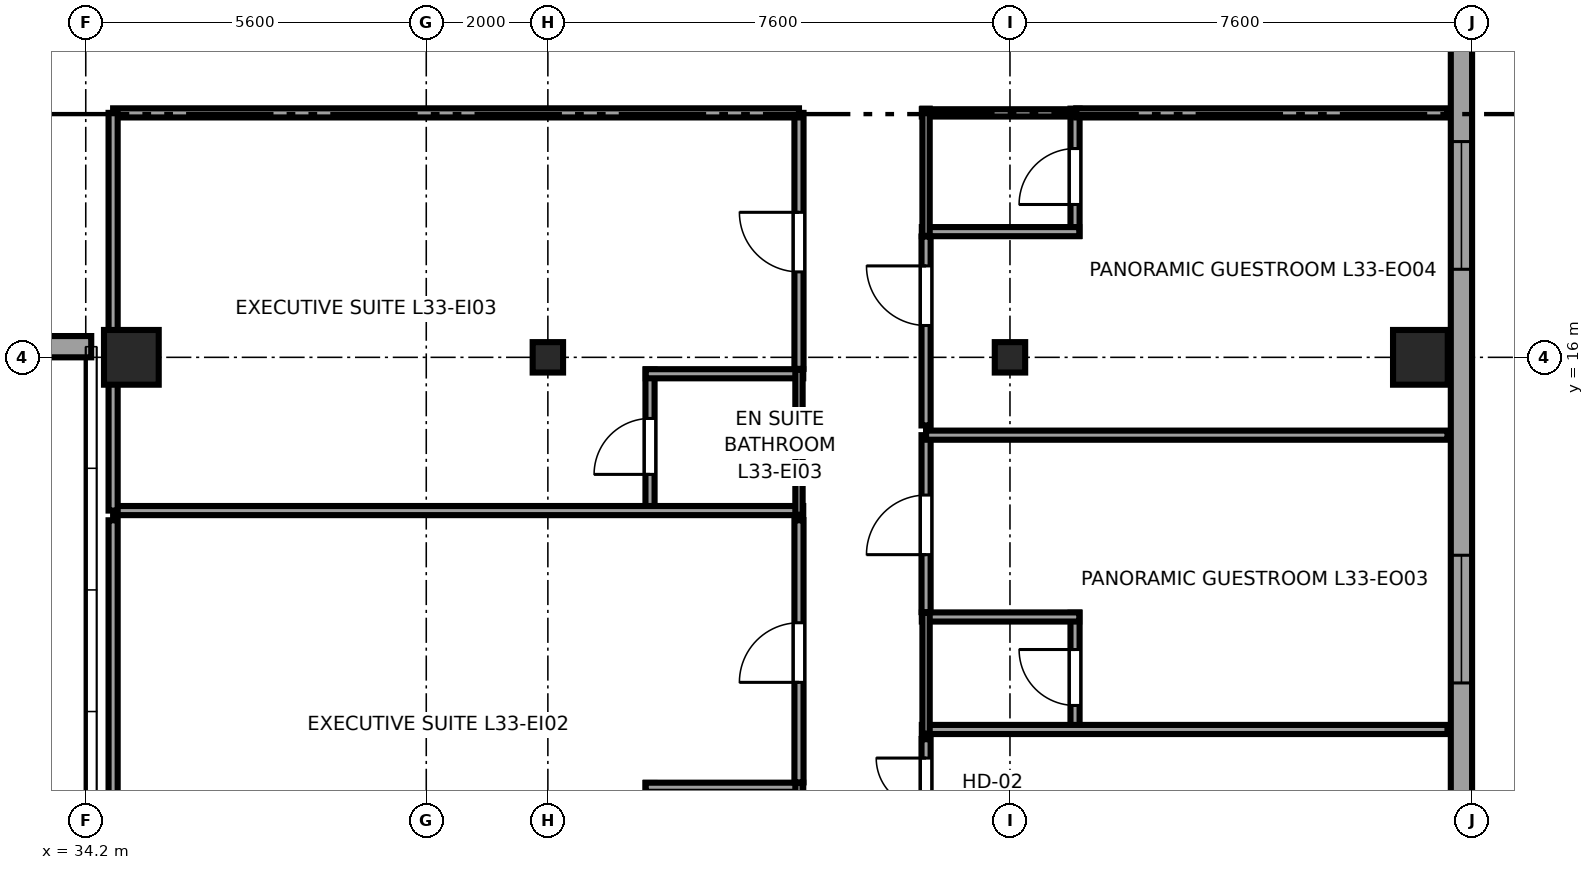
"""IFC4 building model, lengths in metres.
Left out: names, types, materials, properties, quantities, classifications, styles, units other than length and angle.
Written with IfcOpenShell. Run it as: python <this file> out.ifc"""

import sys

from ifc_helpers import new_model, si_unit, direction, frame, frame_2d, origin, origin_2d, place, context, subcontext, project, spatial, rectangle, i_section, extrude, source, transform, mapped, element, fill, save


model = new_model("IFC4")
c1 = context("Model", 3, precision=1e-05, world=origin(), true_north=direction((0.0, 1.0)))
c2 = subcontext(c1, "Body", "Model", "MODEL_VIEW")
j1 = project(units=[si_unit("LENGTHUNIT", "METRE"), si_unit("PLANEANGLEUNIT", "RADIAN")], contexts=[c1])
p1 = place(None, origin())
s1 = spatial("IfcSite", under=j1, at=p1, CompositionType="ELEMENT")
p2 = place(p1, origin())
s2 = spatial("IfcBuilding", under=s1, at=p2, CompositionType="ELEMENT")
p3 = place(p2, frame((0.0, 0.0, 129.3)))
s3 = spatial("IfcBuildingStorey", under=s2, at=p3, CompositionType="ELEMENT", Elevation=129.3)
m1 = source(origin(), c2, "Body", "SweptSolid", [
    extrude(rectangle(XDim=0.9, YDim=0.9, at=origin_2d()), origin(), (0.0, 0.0, 1.0), 3.55),
])
p4 = place(p3, frame((34.95, 16.0, 0.0), z_axis=(0.0, 0.0, 1.0), x_axis=(1.0, 0.0, 0.0)))
e1 = element("IfcColumn", 1, at=p4, inside=s3, PredefinedType="COLUMN", context=c2, shape_type="MappedRepresentation", body=[
    mapped(m1, transform((0.0, 0.0, 0.0), x_axis=(1.0, 0.0, 0.0), y_axis=(0.0, 1.0, 0.0), z_axis=(0.0, 0.0, 1.0), scale=1.0)),
])
m2 = source(origin(), c2, "Body", "SweptSolid", [
    extrude(i_section(OverallWidth=0.5, OverallDepth=0.5, WebThickness=0.022, FlangeThickness=0.034, at=origin_2d()), origin(), (0.0, 0.0, 1.0), 3.55),
])
for number, where, z_axis, x_axis in (
    (2, (41.8, 16.0, 0.0), (0.0, 0.0, 1.0), (1.0, 0.0, 0.0)),
    (3, (49.4, 16.0, 0.0), (0.0, 0.0, 1.0), (1.0, 0.0, 0.0)),
):
    element("IfcColumn", number, at=place(p3, frame(where, z_axis=z_axis, x_axis=x_axis)), inside=s3, PredefinedType="COLUMN", context=c2, shape_type="MappedRepresentation", body=[
        mapped(m2, transform((0.0, 0.0, 0.0), x_axis=(1.0, 0.0, 0.0), y_axis=(0.0, 1.0, 0.0), z_axis=(0.0, 0.0, 1.0), scale=1.0)),
    ])
p5 = place(p3, frame((56.15, 16.0, 0.0), z_axis=(0.0, 0.0, 1.0), x_axis=(1.0, 0.0, 0.0)))
e4 = element("IfcColumn", 4, at=p5, inside=s3, PredefinedType="COLUMN", context=c2, shape_type="MappedRepresentation", body=[
    mapped(m1, transform((0.0, 0.0, 0.0), x_axis=(1.0, 0.0, 0.0), y_axis=(0.0, 1.0, 0.0), z_axis=(0.0, 0.0, 1.0), scale=1.0)),
])
p6 = place(p3, frame((22.71, 16.175, 0.0), z_axis=(0.0, 0.0, 1.0), x_axis=(1.0, 0.0, 0.0)))
e5 = element("IfcWall", 5, at=p6, inside=s3, PredefinedType="SOLIDWALL", context=c2, shape_type="SweptSolid", body=[
    extrude(rectangle(XDim=11.58, YDim=0.35, at=frame_2d((5.79, 0.0))), origin(), (0.0, 0.0, 1.0), 2.748),
])
p7 = place(p6, frame((2.145, 0.0, 0.68)))
e6 = element("IfcOpeningElement", 6, at=p7, cuts=e5, PredefinedType="OPENING", context=c2, shape_type="SweptSolid", body=[
    extrude(rectangle(XDim=2.1, YDim=1.9, at=frame_2d((1.05, 0.95))), frame((0.0, 0.185, 0.0), z_axis=(0.0, -1.0, 0.0), x_axis=(1.0, 0.0, 0.0)), (0.0, 0.0, 1.0), 0.37),
])
p8 = place(p6, frame((7.335, 0.0, 0.68)))
e7 = element("IfcOpeningElement", 7, at=p8, cuts=e5, PredefinedType="OPENING", context=c2, shape_type="SweptSolid", body=[
    extrude(rectangle(XDim=2.1, YDim=1.9, at=frame_2d((1.05, 0.95))), frame((0.0, 0.185, 0.0), z_axis=(0.0, -1.0, 0.0), x_axis=(1.0, 0.0, 0.0)), (0.0, 0.0, 1.0), 0.37),
])
p9 = place(p3, frame((56.825, 4.617, 0.0), z_axis=(0.0, 0.0, 1.0), x_axis=(0.0, 1.0, 0.0)))
e8 = element("IfcWall", 8, at=p9, inside=s3, PredefinedType="SOLIDWALL", context=c2, shape_type="SweptSolid", body=[
    extrude(rectangle(XDim=36.766, YDim=0.35, at=frame_2d((18.383, 0.0))), origin(), (0.0, 0.0, 1.0), 3.37),
])
p10 = place(p9, frame((6.028, 0.0, 0.68)))
e9 = element("IfcOpeningElement", 9, at=p10, cuts=e8, PredefinedType="OPENING", context=c2, shape_type="SweptSolid", body=[
    extrude(rectangle(XDim=2.1, YDim=1.9, at=frame_2d((1.05, 0.95))), frame((0.0, 0.185, 0.0), z_axis=(0.0, -1.0, 0.0), x_axis=(1.0, 0.0, 0.0)), (0.0, 0.0, 1.0), 0.37),
])
p11 = place(p9, frame((12.831, 0.0, 0.68)))
e10 = element("IfcOpeningElement", 10, at=p11, cuts=e8, PredefinedType="OPENING", context=c2, shape_type="SweptSolid", body=[
    extrude(rectangle(XDim=2.1, YDim=1.9, at=frame_2d((1.05, 0.95))), frame((0.0, 0.185, 0.0), z_axis=(0.0, -1.0, 0.0), x_axis=(1.0, 0.0, 0.0)), (0.0, 0.0, 1.0), 0.37),
])
p12 = place(p9, frame((21.285, 0.0, 0.68)))
e11 = element("IfcOpeningElement", 11, at=p12, cuts=e8, PredefinedType="OPENING", context=c2, shape_type="SweptSolid", body=[
    extrude(rectangle(XDim=2.1, YDim=1.9, at=frame_2d((1.05, 0.95))), frame((0.0, 0.185, 0.0), z_axis=(0.0, -1.0, 0.0), x_axis=(1.0, 0.0, 0.0)), (0.0, 0.0, 1.0), 0.37),
])
p13 = place(p9, frame((30.238, 0.0, 0.68)))
e12 = element("IfcOpeningElement", 12, at=p13, cuts=e8, PredefinedType="OPENING", context=c2, shape_type="SweptSolid", body=[
    extrude(rectangle(XDim=2.1, YDim=1.9, at=frame_2d((1.05, 0.95))), frame((0.0, 0.185, 0.0), z_axis=(0.0, -1.0, 0.0), x_axis=(1.0, 0.0, 0.0)), (0.0, 0.0, 1.0), 0.37),
])
p14 = place(p9, frame((1.933, 0.0, 0.62)))
e13 = element("IfcOpeningElement", 13, at=p14, cuts=e8, PredefinedType="OPENING", context=c2, shape_type="SweptSolid", body=[
    extrude(rectangle(XDim=1.5, YDim=1.55, at=frame_2d((0.75, 0.775))), frame((0.0, 0.185, 0.0), z_axis=(0.0, -1.0, 0.0), x_axis=(1.0, 0.0, 0.0)), (0.0, 0.0, 1.0), 0.37),
])
p15 = place(p3, frame((43.48, 6.61, 0.0), z_axis=(0.0, 0.0, 1.0), x_axis=(0.0, 1.0, 0.0)))
e14 = element("IfcWall", 14, at=p15, inside=s3, PredefinedType="PARTITIONING", context=c2, shape_type="SweptSolid", body=[
    extrude(rectangle(XDim=2.39, YDim=0.15, at=frame_2d((1.195, 0.0))), origin(), (0.0, 0.0, 1.0), 3.37),
])
p16 = place(p15, frame((0.665, 0.0, 0.0)))
e15 = element("IfcOpeningElement", 15, at=p16, cuts=e14, PredefinedType="OPENING", context=c2, shape_type="SweptSolid", body=[
    extrude(rectangle(XDim=0.92, YDim=2.01, at=frame_2d((0.46, 1.005))), frame((0.0, 0.085, 0.0), z_axis=(0.0, -1.0, 0.0), x_axis=(1.0, 0.0, 0.0)), (0.0, 0.0, 1.0), 0.17),
])
p17 = place(p3, frame((43.41, 8.93, 0.0), z_axis=(0.0, 0.0, 1.0), x_axis=(1.0, 0.0, 0.0)))
e16 = element("IfcWall", 16, at=p17, inside=s3, PredefinedType="PARTITIONING", context=c2, shape_type="SweptSolid", body=[
    extrude(rectangle(XDim=2.59, YDim=0.15, at=frame_2d((1.295, 0.0))), origin(), (0.0, 0.0, 1.0), 3.37),
])
p18 = place(p3, frame((45.93, 6.61, 0.0), z_axis=(0.0, 0.0, 1.0), x_axis=(0.0, 1.0, 0.0)))
e17 = element("IfcWall", 17, at=p18, inside=s3, PredefinedType="PLUMBINGWALL", context=c2, shape_type="SweptSolid", body=[
    extrude(rectangle(XDim=2.39, YDim=0.12, at=frame_2d((1.195, 0.0))), origin(), (0.0, 0.0, 1.0), 3.37),
])
p19 = place(p3, frame((43.48, 13.41, 0.0), z_axis=(0.0, 0.0, 1.0), x_axis=(0.0, 1.0, 0.0)))
e18 = element("IfcWall", 18, at=p19, inside=s3, PredefinedType="PARTITIONING", context=c2, shape_type="SweptSolid", body=[
    extrude(rectangle(XDim=2.39, YDim=0.15, at=frame_2d((1.195, 0.0))), origin(), (0.0, 0.0, 1.0), 3.37),
])
p20 = place(p19, frame((0.665, 0.0, 0.0)))
e19 = element("IfcOpeningElement", 19, at=p20, cuts=e18, PredefinedType="OPENING", context=c2, shape_type="SweptSolid", body=[
    extrude(rectangle(XDim=0.92, YDim=2.01, at=frame_2d((0.46, 1.005))), frame((0.0, 0.085, 0.0), z_axis=(0.0, -1.0, 0.0), x_axis=(1.0, 0.0, 0.0)), (0.0, 0.0, 1.0), 0.17),
])
p21 = place(p3, frame((34.65, 13.48, 0.0), z_axis=(0.0, 0.0, 1.0), x_axis=(1.0, 0.0, 0.0)))
e20 = element("IfcWall", 20, at=p21, inside=s3, PredefinedType="PARTITIONING", context=c2, shape_type="SweptSolid", body=[
    extrude(rectangle(XDim=11.35, YDim=0.15, at=frame_2d((5.675, 0.0))), origin(), (0.0, 0.0, 1.0), 3.37),
])
p22 = place(p3, frame((43.41, 15.73, 0.0), z_axis=(0.0, 0.0, 1.0), x_axis=(1.0, 0.0, 0.0)))
e21 = element("IfcWall", 21, at=p22, inside=s3, PredefinedType="PARTITIONING", context=c2, shape_type="SweptSolid", body=[
    extrude(rectangle(XDim=2.59, YDim=0.15, at=frame_2d((1.295, 0.0))), origin(), (0.0, 0.0, 1.0), 3.37),
])
p23 = place(p3, frame((45.93, 13.41, 0.0), z_axis=(0.0, 0.0, 1.0), x_axis=(0.0, 1.0, 0.0)))
e22 = element("IfcWall", 22, at=p23, inside=s3, PredefinedType="PLUMBINGWALL", context=c2, shape_type="SweptSolid", body=[
    extrude(rectangle(XDim=2.39, YDim=0.12, at=frame_2d((1.195, 0.0))), origin(), (0.0, 0.0, 1.0), 3.37),
])
p24 = place(p3, frame((50.47, 9.81, 0.0), z_axis=(0.0, 0.0, 1.0), x_axis=(0.0, 1.0, 0.0)))
e23 = element("IfcWall", 23, at=p24, inside=s3, PredefinedType="PARTITIONING", context=c2, shape_type="SweptSolid", body=[
    extrude(rectangle(XDim=1.99, YDim=0.15, at=frame_2d((0.995, 0.0))), origin(), (0.0, 0.0, 1.0), 3.37),
])
p25 = place(p24, frame((0.465, 0.0, 0.0)))
e24 = element("IfcOpeningElement", 24, at=p25, cuts=e23, PredefinedType="OPENING", context=c2, shape_type="SweptSolid", body=[
    extrude(rectangle(XDim=0.92, YDim=2.01, at=frame_2d((0.46, 1.005))), frame((0.0, 0.085, 0.0), z_axis=(0.0, -1.0, 0.0), x_axis=(1.0, 0.0, 0.0)), (0.0, 0.0, 1.0), 0.17),
])
p26 = place(p3, frame((47.95, 9.88, 0.0), z_axis=(0.0, 0.0, 1.0), x_axis=(1.0, 0.0, 0.0)))
e25 = element("IfcWall", 25, at=p26, inside=s3, PredefinedType="PARTITIONING", context=c2, shape_type="SweptSolid", body=[
    extrude(rectangle(XDim=8.645, YDim=0.15, at=frame_2d((4.323, 0.0))), origin(), (0.0, 0.0, 1.0), 3.37),
])
p27 = place(p3, frame((47.95, 11.73, 0.0), z_axis=(0.0, 0.0, 1.0), x_axis=(1.0, 0.0, 0.0)))
e26 = element("IfcWall", 26, at=p27, inside=s3, PredefinedType="PARTITIONING", context=c2, shape_type="SweptSolid", body=[
    extrude(rectangle(XDim=2.59, YDim=0.15, at=frame_2d((1.295, 0.0))), origin(), (0.0, 0.0, 1.0), 3.37),
])
p28 = place(p3, frame((48.02, 9.81, 0.0), z_axis=(0.0, 0.0, 1.0), x_axis=(0.0, 1.0, 0.0)))
e27 = element("IfcWall", 27, at=p28, inside=s3, PredefinedType="PLUMBINGWALL", context=c2, shape_type="SweptSolid", body=[
    extrude(rectangle(XDim=1.99, YDim=0.12, at=frame_2d((0.995, 0.0))), origin(), (0.0, 0.0, 1.0), 3.37),
])
p29 = place(p3, frame((50.47, 17.997, 0.0), z_axis=(0.0, 0.0, 1.0), x_axis=(0.0, 1.0, 0.0)))
e28 = element("IfcWall", 28, at=p29, inside=s3, PredefinedType="PARTITIONING", context=c2, shape_type="SweptSolid", body=[
    extrude(rectangle(XDim=2.093, YDim=0.15, at=frame_2d((1.046, 0.0))), origin(), (0.0, 0.0, 1.0), 3.37),
])
p30 = place(p29, frame((0.517, 0.0, 0.0)))
e29 = element("IfcOpeningElement", 29, at=p30, cuts=e28, PredefinedType="OPENING", context=c2, shape_type="SweptSolid", body=[
    extrude(rectangle(XDim=0.92, YDim=2.01, at=frame_2d((0.46, 1.005))), frame((0.0, 0.085, 0.0), z_axis=(0.0, -1.0, 0.0), x_axis=(1.0, 0.0, 0.0)), (0.0, 0.0, 1.0), 0.17),
])
p31 = place(p3, frame((47.95, 18.067, 0.0), z_axis=(0.0, 0.0, 1.0), x_axis=(1.0, 0.0, 0.0)))
e30 = element("IfcWall", 30, at=p31, inside=s3, PredefinedType="PARTITIONING", context=c2, shape_type="SweptSolid", body=[
    extrude(rectangle(XDim=2.59, YDim=0.15, at=frame_2d((1.295, 0.0))), origin(), (0.0, 0.0, 1.0), 3.37),
])
p32 = place(p3, frame((47.95, 20.02, 0.0), z_axis=(0.0, 0.0, 1.0), x_axis=(1.0, 0.0, 0.0)))
e31 = element("IfcWall", 31, at=p32, inside=s3, PredefinedType="PLUMBINGWALL", context=c2, shape_type="SweptSolid", body=[
    extrude(rectangle(XDim=2.59, YDim=0.12, at=frame_2d((1.295, 0.0))), origin(), (0.0, 0.0, 1.0), 3.37),
])
p33 = place(p3, frame((48.02, 17.997, 0.0), z_axis=(0.0, 0.0, 1.0), x_axis=(0.0, 1.0, 0.0)))
e32 = element("IfcWall", 32, at=p33, inside=s3, PredefinedType="PLUMBINGWALL", context=c2, shape_type="SweptSolid", body=[
    extrude(rectangle(XDim=2.093, YDim=0.12, at=frame_2d((1.046, 0.0))), origin(), (0.0, 0.0, 1.0), 3.37),
])
p34 = place(p3, frame((45.93, 9.01, 0.0), z_axis=(0.0, 0.0, 1.0), x_axis=(0.0, 1.0, 0.0)))
e33 = element("IfcWall", 33, at=p34, inside=s3, PredefinedType="PARTITIONING", context=c2, shape_type="SweptSolid", body=[
    extrude(rectangle(XDim=4.31, YDim=0.15, at=frame_2d((2.155, 0.0))), origin(), (0.0, 0.0, 1.0), 3.37),
])
p35 = place(p34, frame((1.645, 0.0, 0.0)))
e34 = element("IfcOpeningElement", 34, at=p35, cuts=e33, PredefinedType="OPENING", context=c2, shape_type="SweptSolid", body=[
    extrude(rectangle(XDim=0.98, YDim=2.12, at=frame_2d((0.49, 1.06))), frame((0.0, 0.085, 0.0), z_axis=(0.0, -1.0, 0.0), x_axis=(1.0, 0.0, 0.0)), (0.0, 0.0, 1.0), 0.17),
])
p36 = place(p3, frame((34.65, 6.68, 0.0), z_axis=(0.0, 0.0, 1.0), x_axis=(0.0, 1.0, 0.0)))
e35 = element("IfcWall", 35, at=p36, inside=s3, PredefinedType="PARTITIONING", context=c2, shape_type="SweptSolid", body=[
    extrude(rectangle(XDim=6.64, YDim=0.15, at=frame_2d((3.32, 0.0))), origin(), (0.0, 0.0, 1.0), 3.37),
])
p37 = place(p3, frame((45.93, 15.81, 0.0), z_axis=(0.0, 0.0, 1.0), x_axis=(0.0, 1.0, 0.0)))
e36 = element("IfcWall", 36, at=p37, inside=s3, PredefinedType="PARTITIONING", context=c2, shape_type="SweptSolid", body=[
    extrude(rectangle(XDim=4.21, YDim=0.15, at=frame_2d((2.105, 0.0))), origin(), (0.0, 0.0, 1.0), 3.37),
])
p38 = place(p37, frame((1.595, 0.0, 0.0)))
e37 = element("IfcOpeningElement", 37, at=p38, cuts=e36, PredefinedType="OPENING", context=c2, shape_type="SweptSolid", body=[
    extrude(rectangle(XDim=0.98, YDim=2.12, at=frame_2d((0.49, 1.06))), frame((0.0, 0.085, 0.0), z_axis=(0.0, -1.0, 0.0), x_axis=(1.0, 0.0, 0.0)), (0.0, 0.0, 1.0), 0.17),
])
p39 = place(p3, frame((34.65, 20.02, 0.0), z_axis=(0.0, 0.0, 1.0), x_axis=(1.0, 0.0, 0.0)))
e38 = element("IfcWall", 38, at=p39, inside=s3, PredefinedType="PARTITIONING", context=c2, shape_type="SweptSolid", body=[
    extrude(rectangle(XDim=11.28, YDim=0.15, at=frame_2d((5.64, 0.0))), origin(), (0.0, 0.0, 1.0), 2.954),
])
p40 = place(p3, frame((34.65, 13.48, 0.0), z_axis=(0.0, 0.0, 1.0), x_axis=(0.0, 1.0, 0.0)))
e39 = element("IfcWall", 39, at=p40, inside=s3, PredefinedType="PARTITIONING", context=c2, shape_type="SweptSolid", body=[
    extrude(rectangle(XDim=6.54, YDim=0.15, at=frame_2d((3.27, 0.0))), origin(), (0.0, 0.0, 1.0), 3.37),
])
p41 = place(p3, frame((48.02, 6.81, 0.0), z_axis=(0.0, 0.0, 1.0), x_axis=(0.0, 1.0, 0.0)))
e40 = element("IfcWall", 40, at=p41, inside=s3, PredefinedType="PARTITIONING", context=c2, shape_type="SweptSolid", body=[
    extrude(rectangle(XDim=2.91, YDim=0.15, at=frame_2d((1.455, 0.0))), origin(), (0.0, 0.0, 1.0), 3.37),
])
p42 = place(p41, frame((1.78, 0.0, 0.0)))
e41 = element("IfcOpeningElement", 41, at=p42, cuts=e40, PredefinedType="OPENING", context=c2, shape_type="SweptSolid", body=[
    extrude(rectangle(XDim=0.82, YDim=2.01, at=frame_2d((0.41, 1.005))), frame((0.0, 0.085, 0.0), z_axis=(0.0, -1.0, 0.0), x_axis=(1.0, 0.0, 0.0)), (0.0, 0.0, 1.0), 0.17),
])
p43 = place(p3, frame((48.02, 11.81, 0.0), z_axis=(0.0, 0.0, 1.0), x_axis=(0.0, 1.0, 0.0)))
e42 = element("IfcWall", 42, at=p43, inside=s3, PredefinedType="PARTITIONING", context=c2, shape_type="SweptSolid", body=[
    extrude(rectangle(XDim=2.91, YDim=0.15, at=frame_2d((1.455, 0.0))), origin(), (0.0, 0.0, 1.0), 3.37),
])
p44 = place(p43, frame((0.945, 0.0, 0.0)))
e43 = element("IfcOpeningElement", 43, at=p44, cuts=e42, PredefinedType="OPENING", context=c2, shape_type="SweptSolid", body=[
    extrude(rectangle(XDim=0.98, YDim=2.12, at=frame_2d((0.49, 1.06))), frame((0.0, 0.085, 0.0), z_axis=(0.0, -1.0, 0.0), x_axis=(1.0, 0.0, 0.0)), (0.0, 0.0, 1.0), 0.17),
])
p45 = place(p3, frame((48.02, 14.72, 0.0), z_axis=(0.0, 0.0, 1.0), x_axis=(1.0, 0.0, 0.0)))
e44 = element("IfcWall", 44, at=p45, inside=s3, PredefinedType="PARTITIONING", context=c2, shape_type="SweptSolid", body=[
    extrude(rectangle(XDim=8.575, YDim=0.15, at=frame_2d((4.288, 0.0))), origin(), (0.0, 0.0, 1.0), 3.37),
])
p46 = place(p3, frame((48.02, 14.88, 0.0), z_axis=(0.0, 0.0, 1.0), x_axis=(0.0, 1.0, 0.0)))
e45 = element("IfcWall", 45, at=p46, inside=s3, PredefinedType="PARTITIONING", context=c2, shape_type="SweptSolid", body=[
    extrude(rectangle(XDim=3.107, YDim=0.15, at=frame_2d((1.554, 0.0))), origin(), (0.0, 0.0, 1.0), 3.37),
])
p47 = place(p46, frame((1.644, 0.0, 0.0)))
e46 = element("IfcOpeningElement", 46, at=p47, cuts=e45, PredefinedType="OPENING", context=c2, shape_type="SweptSolid", body=[
    extrude(rectangle(XDim=0.98, YDim=2.12, at=frame_2d((0.49, 1.06))), frame((0.0, 0.085, 0.0), z_axis=(0.0, -1.0, 0.0), x_axis=(1.0, 0.0, 0.0)), (0.0, 0.0, 1.0), 0.17),
])
p48 = place(p3, frame((50.49, 20.02, 0.0), z_axis=(0.0, 0.0, 1.0), x_axis=(1.0, 0.0, 0.0)))
e47 = element("IfcWall", 47, at=p48, inside=s3, PredefinedType="PARTITIONING", context=c2, shape_type="SweptSolid", body=[
    extrude(rectangle(XDim=6.105, YDim=0.15, at=frame_2d((3.052, 0.0))), origin(), (0.0, 0.0, 1.0), 3.37),
])
m3 = source(origin(), c2, "Body", "SweptSolid", [
    extrude(rectangle(XDim=2.1, YDim=1.9, at=frame_2d((1.05, 0.95))), frame((0.0, 0.09, 0.0), z_axis=(0.0, -1.0, 0.0), x_axis=(1.0, 0.0, 0.0)), (0.0, 0.0, 1.0), 0.06),
])
p49 = place(p10, origin())
e48 = element("IfcWindow", 48, at=p49, inside=s3, PartitioningType="TRIPLE_PANEL_HORIZONTAL", PredefinedType="WINDOW", context=c2, shape_type="MappedRepresentation", body=[
    mapped(m3, transform((0.0, 0.0, 0.0), x_axis=(1.0, 0.0, 0.0), y_axis=(0.0, 1.0, 0.0), z_axis=(0.0, 0.0, 1.0), scale=1.0)),
])
fill(e9, e48)
p50 = place(p11, origin())
e49 = element("IfcWindow", 49, at=p50, inside=s3, PartitioningType="TRIPLE_PANEL_HORIZONTAL", PredefinedType="WINDOW", context=c2, shape_type="MappedRepresentation", body=[
    mapped(m3, transform((0.0, 0.0, 0.0), x_axis=(1.0, 0.0, 0.0), y_axis=(0.0, 1.0, 0.0), z_axis=(0.0, 0.0, 1.0), scale=1.0)),
])
fill(e10, e49)
m4 = source(origin(), c2, "Body", "SweptSolid", [
    extrude(rectangle(XDim=0.92, YDim=2.01, at=frame_2d((0.46, 1.005))), frame((0.0, 0.025, 0.0), z_axis=(0.0, -1.0, 0.0), x_axis=(1.0, 0.0, 0.0)), (0.0, 0.0, 1.0), 0.05),
])
p51 = place(p20, origin())
e50 = element("IfcDoor", 50, at=p51, inside=s3, OperationType="SINGLE_SWING_LEFT", PredefinedType="DOOR", context=c2, shape_type="MappedRepresentation", body=[
    mapped(m4, transform((0.0, 0.0, 0.0), x_axis=(1.0, 0.0, 0.0), y_axis=(0.0, 1.0, 0.0), z_axis=(0.0, 0.0, 1.0), scale=1.0)),
])
fill(e19, e50)
p52 = place(p25, origin())
e51 = element("IfcDoor", 51, at=p52, inside=s3, OperationType="SINGLE_SWING_RIGHT", PredefinedType="DOOR", context=c2, shape_type="MappedRepresentation", body=[
    mapped(m4, transform((0.0, 0.0, 0.0), x_axis=(1.0, 0.0, 0.0), y_axis=(0.0, 1.0, 0.0), z_axis=(0.0, 0.0, 1.0), scale=1.0)),
])
fill(e24, e51)
p53 = place(p30, origin())
e52 = element("IfcDoor", 52, at=p53, inside=s3, OperationType="SINGLE_SWING_LEFT", PredefinedType="DOOR", context=c2, shape_type="MappedRepresentation", body=[
    mapped(m4, transform((0.0, 0.0, 0.0), x_axis=(1.0, 0.0, 0.0), y_axis=(0.0, 1.0, 0.0), z_axis=(0.0, 0.0, 1.0), scale=1.0)),
])
fill(e29, e52)
m5 = source(origin(), c2, "Body", "SweptSolid", [
    extrude(rectangle(XDim=0.98, YDim=2.12, at=frame_2d((0.49, 1.06))), frame((0.0, 0.025, 0.0), z_axis=(0.0, -1.0, 0.0), x_axis=(1.0, 0.0, 0.0)), (0.0, 0.0, 1.0), 0.05),
])
p54 = place(p35, origin())
e53 = element("IfcDoor", 53, at=p54, inside=s3, OperationType="SINGLE_SWING_LEFT", PredefinedType="DOOR", context=c2, shape_type="MappedRepresentation", body=[
    mapped(m5, transform((0.0, 0.0, 0.0), x_axis=(1.0, 0.0, 0.0), y_axis=(0.0, 1.0, 0.0), z_axis=(0.0, 0.0, 1.0), scale=1.0)),
])
fill(e34, e53)
p55 = place(p38, origin())
e54 = element("IfcDoor", 54, at=p55, inside=s3, OperationType="SINGLE_SWING_RIGHT", PredefinedType="DOOR", context=c2, shape_type="MappedRepresentation", body=[
    mapped(m5, transform((0.0, 0.0, 0.0), x_axis=(1.0, 0.0, 0.0), y_axis=(0.0, 1.0, 0.0), z_axis=(0.0, 0.0, 1.0), scale=1.0)),
])
fill(e37, e54)
m6 = source(origin(), c2, "Body", "SweptSolid", [
    extrude(rectangle(XDim=0.82, YDim=2.01, at=frame_2d((0.41, 1.005))), frame((0.0, 0.025, 0.0), z_axis=(0.0, -1.0, 0.0), x_axis=(1.0, 0.0, 0.0)), (0.0, 0.0, 1.0), 0.05),
])
p56 = place(p42, origin())
e55 = element("IfcDoor", 55, at=p56, inside=s3, OperationType="SINGLE_SWING_RIGHT", PredefinedType="DOOR", context=c2, shape_type="MappedRepresentation", body=[
    mapped(m6, transform((0.0, 0.0, 0.0), x_axis=(1.0, 0.0, 0.0), y_axis=(0.0, 1.0, 0.0), z_axis=(0.0, 0.0, 1.0), scale=1.0)),
])
fill(e41, e55)
p57 = place(p44, origin())
e56 = element("IfcDoor", 56, at=p57, inside=s3, OperationType="SINGLE_SWING_LEFT", PredefinedType="DOOR", context=c2, shape_type="MappedRepresentation", body=[
    mapped(m5, transform((0.0, 0.0, 0.0), x_axis=(1.0, 0.0, 0.0), y_axis=(0.0, 1.0, 0.0), z_axis=(0.0, 0.0, 1.0), scale=1.0)),
])
fill(e43, e56)
p58 = place(p47, origin())
e57 = element("IfcDoor", 57, at=p58, inside=s3, OperationType="SINGLE_SWING_RIGHT", PredefinedType="DOOR", context=c2, shape_type="MappedRepresentation", body=[
    mapped(m5, transform((0.0, 0.0, 0.0), x_axis=(1.0, 0.0, 0.0), y_axis=(0.0, 1.0, 0.0), z_axis=(0.0, 0.0, 1.0), scale=1.0)),
])
fill(e46, e57)
save(model, sys.argv[1])
